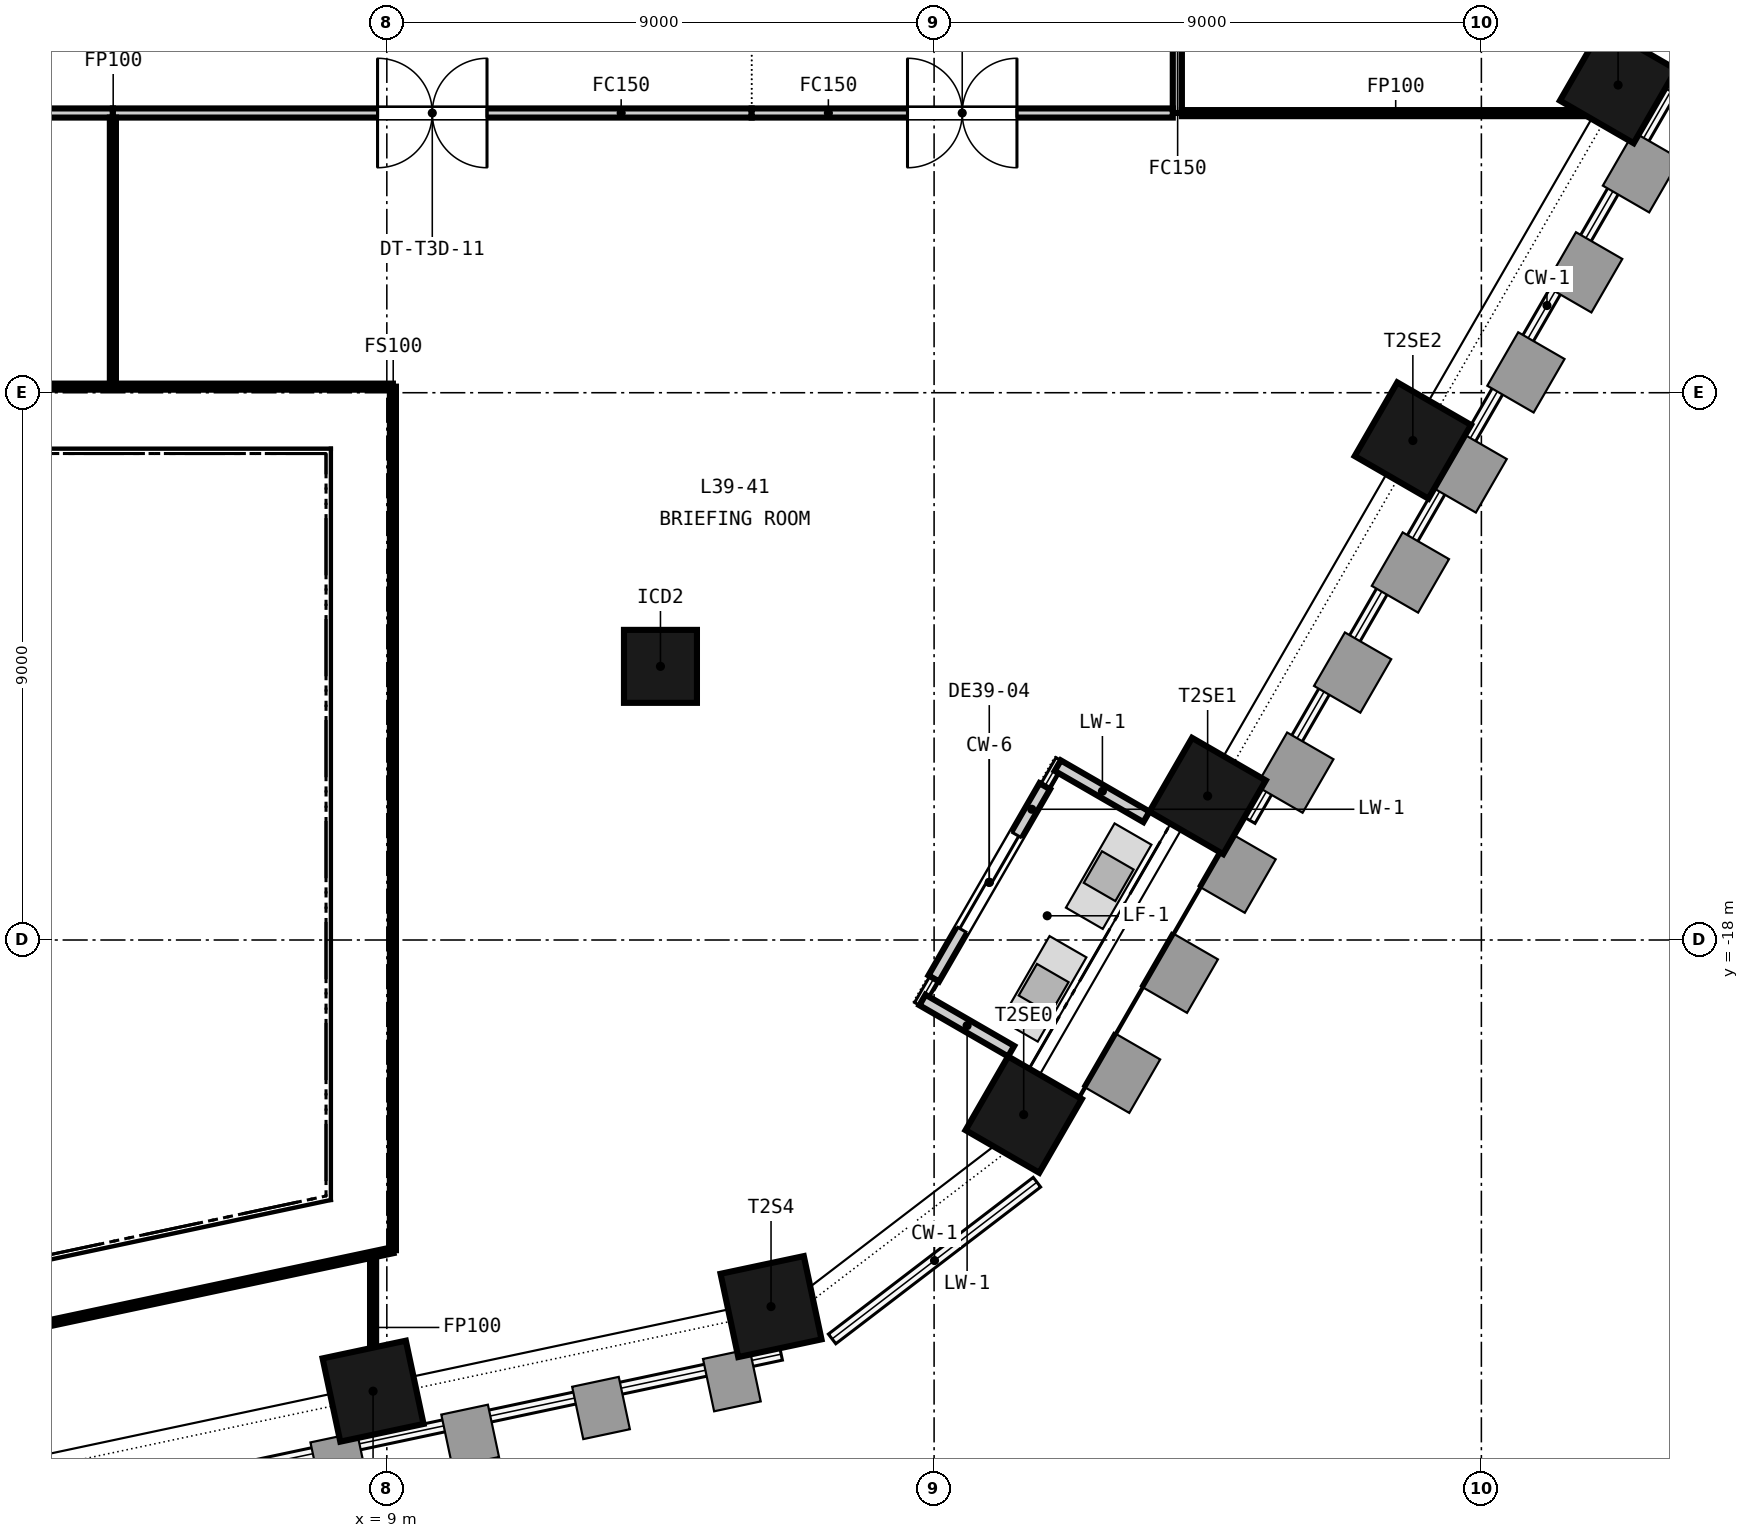
"""IFC4 building model, lengths in metres.
Left out: names, types, materials, properties, quantities, classifications, styles, units other than length and angle.
Written with IfcOpenShell. Run it as: python <this file> out.ifc"""

import sys

from ifc_helpers import new_model, si_unit, direction, frame, frame_2d, origin, origin_2d, place, context, subcontext, project, spatial, rectangle, extrude, element, fill, save


model = new_model("IFC4")
c1 = context("Model", 3, precision=1e-05, world=origin(), true_north=direction((0.0, 1.0)))
c2 = subcontext(c1, "Body", "Model", "MODEL_VIEW")
j1 = project(units=[si_unit("LENGTHUNIT", "METRE"), si_unit("PLANEANGLEUNIT", "RADIAN")], contexts=[c1])
p1 = place(None, origin())
s1 = spatial("IfcSite", under=j1, at=p1, CompositionType="ELEMENT")
p2 = place(p1, origin())
s2 = spatial("IfcBuilding", under=s1, at=p2, CompositionType="ELEMENT")
p3 = place(p2, frame((0.0, 0.0, 159.0)))
s3 = spatial("IfcBuildingStorey", under=s2, at=p3, CompositionType="ELEMENT", Elevation=159.0)
for number, where, z_axis, x_axis in (
    (1, (8.774, -25.419, -0.15), (0.0, 0.0, 1.0), (0.978, 0.208, 0.0)),
    (2, (15.318, -24.028, -0.15), (0.0, 0.0, 1.0), (0.978, 0.208, 0.0)),
    (3, (19.473, -20.871, -0.15), (0.0, 0.0, 1.0), (0.5, 0.866, 0.0)),
    (4, (22.498, -15.632, -0.15), (0.0, 0.0, 1.0), (0.5, 0.866, 0.0)),
    (5, (25.873, -9.786, -0.15), (0.0, 0.0, 1.0), (0.5, 0.866, 0.0)),
    (6, (29.248, -3.94, -0.15), (0.0, 0.0, 1.0), (0.5, 0.866, 0.0)),
):
    element("IfcColumn", number, at=place(p3, frame(where, z_axis=z_axis, x_axis=x_axis)), inside=s3, PredefinedType="COLUMN", context=c2, shape_type="SweptSolid", body=[
        extrude(rectangle(XDim=1.4, YDim=1.4, at=origin_2d()), origin(), (0.0, 0.0, 1.0), 3.65),
    ])
p4 = place(p3, frame((13.5, -13.5, -0.15), z_axis=(0.0, 0.0, 1.0), x_axis=(1.0, 0.0, 0.0)))
e7 = element("IfcColumn", 7, at=p4, inside=s3, PredefinedType="COLUMN", context=c2, shape_type="SweptSolid", body=[
    extrude(rectangle(XDim=1.2, YDim=1.2, at=origin_2d()), origin(), (0.0, 0.0, 1.0), 3.65),
])
p5 = place(p3, frame((17.995, -18.632, 0.0), z_axis=(0.0, 0.0, 1.0), x_axis=(0.499973348067, 0.866040790738, 0.0)))
e8 = element("IfcWall", 8, at=p5, inside=s3, PredefinedType="SOLIDWALL", context=c2, shape_type="SweptSolid", body=[
    extrude(rectangle(XDim=3.65, YDim=0.2, at=frame_2d((1.825, 0.0))), origin(), (0.0, 0.0, 1.0), 2.9),
])
p6 = place(p5, frame((0.925, 0.0, 0.0)))
e9 = element("IfcOpeningElement", 9, at=p6, cuts=e8, PredefinedType="OPENING", context=c2, shape_type="SweptSolid", body=[
    extrude(rectangle(XDim=1.8, YDim=2.4, at=frame_2d((0.9, 1.2))), frame((0.0, 0.11, 0.0), z_axis=(0.0, -1.0, 0.0), x_axis=(1.0, 0.0, 0.0)), (0.0, 0.0, 1.0), 0.22),
])
p7 = place(p3, frame((19.267, -19.829, 0.0), z_axis=(0.0, 0.0, 1.0), x_axis=(-0.866031085144, 0.499990159468, 0.0)))
e10 = element("IfcWall", 10, at=p7, inside=s3, PredefinedType="SOLIDWALL", context=c2, shape_type="SweptSolid", body=[
    extrude(rectangle(XDim=1.684, YDim=0.2, at=frame_2d((0.842, 0.0))), origin(), (0.0, 0.0, 1.0), 3.05),
])
p8 = place(p3, frame((21.492, -15.975, 0.0), z_axis=(0.0, 0.0, 1.0), x_axis=(-0.865994838069, 0.500052937636, 0.0)))
e11 = element("IfcWall", 11, at=p8, inside=s3, PredefinedType="SOLIDWALL", context=c2, shape_type="SweptSolid", body=[
    extrude(rectangle(XDim=1.684, YDim=0.2, at=frame_2d((0.842, 0.0))), origin(), (0.0, 0.0, 1.0), 3.05),
])
p9 = place(p3, frame((4.495, -4.4, 0.0), z_axis=(0.0, 0.0, 1.0), x_axis=(-1.0, 0.0, 0.0)))
e12 = element("IfcWall", 12, at=p9, inside=s3, PredefinedType="PARTITIONING", context=c2, shape_type="SweptSolid", body=[
    extrude(rectangle(XDim=19.495, YDim=0.15, at=frame_2d((9.748, 0.0))), origin(), (0.0, 0.0, 1.0), 2.741),
])
p10 = place(p9, frame((8.847, 0.0, 0.0)))
e13 = element("IfcOpeningElement", 13, at=p10, cuts=e12, PredefinedType="OPENING", context=c2, shape_type="SweptSolid", body=[
    extrude(rectangle(XDim=1.8, YDim=2.1, at=frame_2d((0.9, 1.05))), frame((0.0, 0.085, 0.0), z_axis=(0.0, -1.0, 0.0), x_axis=(1.0, 0.0, 0.0)), (0.0, 0.0, 1.0), 0.17),
])
p11 = place(p3, frame((15.0, -4.4, 0.0), z_axis=(0.0, 0.0, 1.0), x_axis=(-1.0, 0.0, 0.0)))
e14 = element("IfcWall", 14, at=p11, inside=s3, PredefinedType="PARTITIONING", context=c2, shape_type="SweptSolid", body=[
    extrude(rectangle(XDim=10.505, YDim=0.15, at=frame_2d((5.252, 0.0))), origin(), (0.0, 0.0, 1.0), 2.741),
])
p12 = place(p11, frame((4.353, 0.0, 0.0)))
e15 = element("IfcOpeningElement", 15, at=p12, cuts=e14, PredefinedType="OPENING", context=c2, shape_type="SweptSolid", body=[
    extrude(rectangle(XDim=1.8, YDim=2.1, at=frame_2d((0.9, 1.05))), frame((0.0, 0.085, 0.0), z_axis=(0.0, -1.0, 0.0), x_axis=(1.0, 0.0, 0.0)), (0.0, 0.0, 1.0), 0.17),
])
p13 = place(p3, frame((22.0, 0.0, 0.0), z_axis=(0.0, 0.0, 1.0), x_axis=(0.0, -1.0, 0.0)))
e16 = element("IfcWall", 16, at=p13, inside=s3, PredefinedType="PARTITIONING", context=c2, shape_type="SweptSolid", body=[
    extrude(rectangle(XDim=4.4, YDim=0.15, at=frame_2d((2.2, 0.0))), origin(), (0.0, 0.0, 1.0), 2.741),
])
p14 = place(p3, frame((21.925, -4.4, 0.0), z_axis=(0.0, 0.0, 1.0), x_axis=(-1.0, 0.0, 0.0)))
e17 = element("IfcWall", 17, at=p14, inside=s3, PredefinedType="PARTITIONING", context=c2, shape_type="SweptSolid", body=[
    extrude(rectangle(XDim=6.925, YDim=0.15, at=frame_2d((3.462, 0.0))), origin(), (0.0, 0.0, 1.0), 2.741),
])
p15 = place(p14, frame((2.562, 0.0, 0.0)))
e18 = element("IfcOpeningElement", 18, at=p15, cuts=e17, PredefinedType="OPENING", context=c2, shape_type="SweptSolid", body=[
    extrude(rectangle(XDim=1.8, YDim=2.1, at=frame_2d((0.9, 1.05))), frame((0.0, 0.085, 0.0), z_axis=(0.0, -1.0, 0.0), x_axis=(1.0, 0.0, 0.0)), (0.0, 0.0, 1.0), 0.17),
])
p16 = place(p3, frame((22.075, -4.402, 0.0), z_axis=(0.0, 0.0, 1.0), x_axis=(1.0, 0.0, 0.0)))
e19 = element("IfcWall", 19, at=p16, inside=s3, PredefinedType="PARTITIONING", context=c2, shape_type="SweptSolid", body=[
    extrude(rectangle(XDim=7.022, YDim=0.1, at=frame_2d((3.511, 0.0))), origin(), (0.0, 0.0, 1.0), 2.741),
])
p17 = place(p3, frame((4.495, -8.85, 0.0), z_axis=(0.0, 0.0, 1.0), x_axis=(0.0, 1.0, 0.0)))
e20 = element("IfcWall", 20, at=p17, inside=s3, PredefinedType="PARTITIONING", context=c2, shape_type="SweptSolid", body=[
    extrude(rectangle(XDim=4.375, YDim=0.1, at=frame_2d((2.188, 0.0))), origin(), (0.0, 0.0, 1.0), 2.741),
])
p18 = place(p3, frame((8.774, -25.522, 0.0), z_axis=(0.0, 0.0, 1.0), x_axis=(0.0, 1.0, 0.0)))
e21 = element("IfcWall", 21, at=p18, inside=s3, PredefinedType="PARTITIONING", context=c2, shape_type="SweptSolid", body=[
    extrude(rectangle(XDim=2.301, YDim=0.1, at=frame_2d((1.15, 0.0))), origin(), (0.0, 0.0, 1.0), 2.741),
])
p19 = place(p3, frame((-9.1, -8.9, 0.0), z_axis=(0.0, 0.0, 1.0), x_axis=(1.0, 0.0, 0.0)))
e22 = element("IfcWall", 22, at=p19, inside=s3, PredefinedType="PARTITIONING", context=c2, shape_type="SweptSolid", body=[
    extrude(rectangle(XDim=18.2, YDim=0.1, at=frame_2d((9.1, 0.0))), origin(), (0.0, 0.0, 1.0), 2.741),
])
p20 = place(p3, frame((9.1, -8.9, 0.0), z_axis=(0.0, 0.0, 1.0), x_axis=(0.0, -1.0, 0.0)))
e23 = element("IfcWall", 23, at=p20, inside=s3, PredefinedType="PARTITIONING", context=c2, shape_type="SweptSolid", body=[
    extrude(rectangle(XDim=14.201, YDim=0.1, at=frame_2d((7.101, 0.0))), origin(), (0.0, 0.0, 1.0), 2.741),
])
p21 = place(p3, frame((9.1, -23.101, 0.0), z_axis=(0.0, 0.0, 1.0), x_axis=(-0.978146710971, -0.207915876778, 0.0)))
e24 = element("IfcWall", 24, at=p21, inside=s3, PredefinedType="PARTITIONING", context=c2, shape_type="SweptSolid", body=[
    extrude(rectangle(XDim=18.607, YDim=0.1, at=frame_2d((9.303, 0.0))), origin(), (0.0, 0.0, 1.0), 2.741),
])
p22 = place(p6, origin())
e25 = element("IfcDoor", 25, at=p22, inside=s3, OperationType="SINGLE_SWING_LEFT", PredefinedType="DOOR", context=c2, shape_type="SweptSolid", body=[
    extrude(rectangle(XDim=1.8, YDim=2.4, at=frame_2d((0.9, 1.2))), frame((0.0, 0.025, 0.0), z_axis=(0.0, -1.0, 0.0), x_axis=(1.0, 0.0, 0.0)), (0.0, 0.0, 1.0), 0.05),
])
fill(e9, e25)
p23 = place(p12, origin())
e26 = element("IfcDoor", 26, at=p23, inside=s3, OperationType="DOUBLE_DOOR_DOUBLE_SWING", PredefinedType="DOOR", context=c2, shape_type="SweptSolid", body=[
    extrude(rectangle(XDim=1.8, YDim=2.1, at=frame_2d((0.9, 1.05))), frame((0.0, 0.025, 0.0), z_axis=(0.0, -1.0, 0.0), x_axis=(1.0, 0.0, 0.0)), (0.0, 0.0, 1.0), 0.05),
])
fill(e15, e26)
p24 = place(p15, origin())
e27 = element("IfcDoor", 27, at=p24, inside=s3, OperationType="DOUBLE_DOOR_DOUBLE_SWING", PredefinedType="DOOR", context=c2, shape_type="SweptSolid", body=[
    extrude(rectangle(XDim=1.8, YDim=2.1, at=frame_2d((0.9, 1.05))), frame((0.0, 0.025, 0.0), z_axis=(0.0, -1.0, 0.0), x_axis=(1.0, 0.0, 0.0)), (0.0, 0.0, 1.0), 0.05),
])
fill(e18, e27)
save(model, sys.argv[1])
